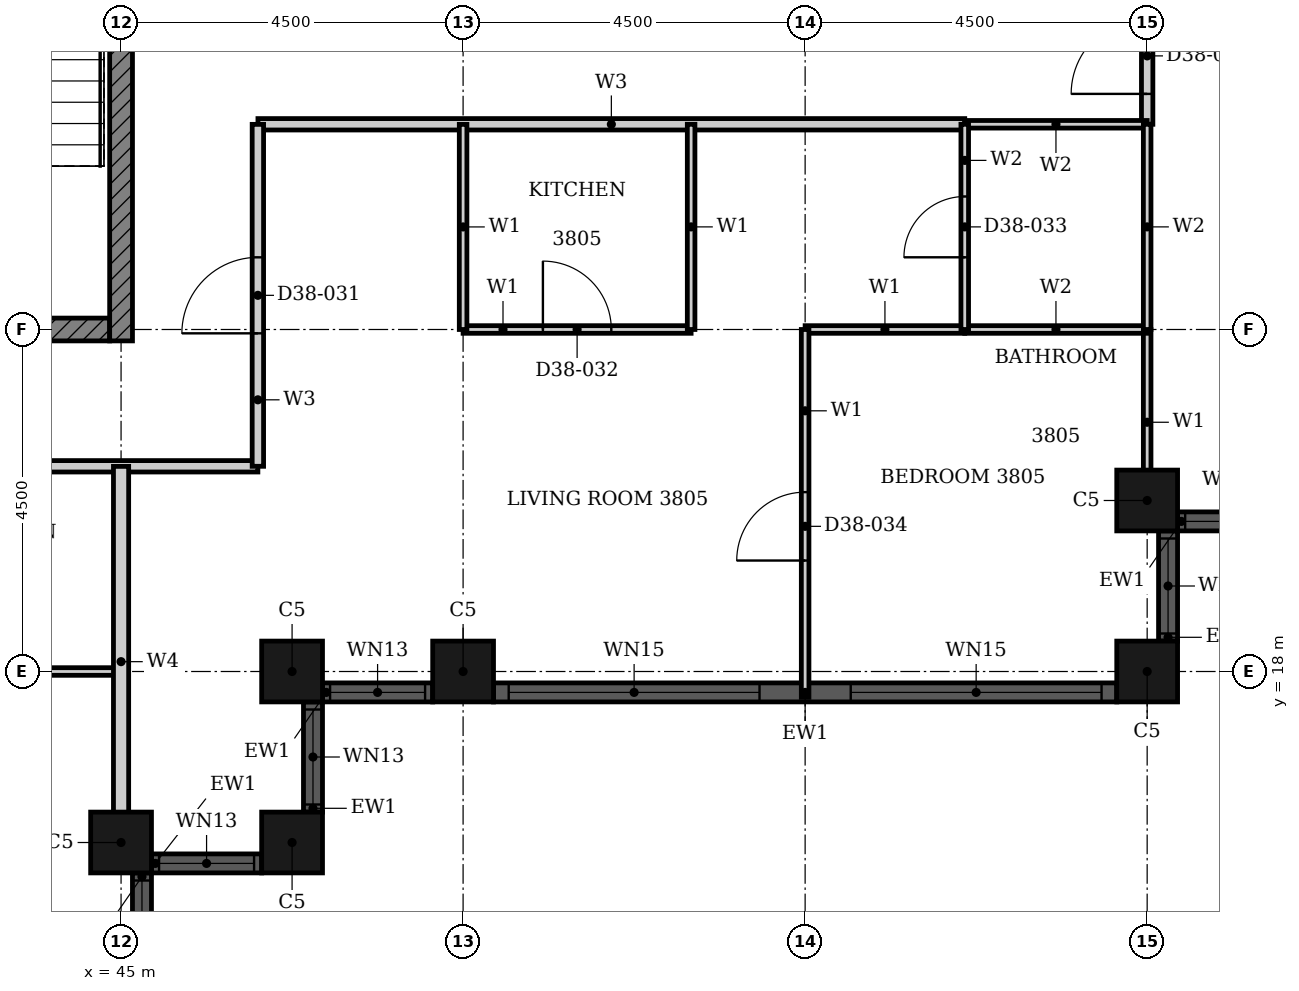
"""IFC4 building model, lengths in metres.
Left out: names, types, materials, properties, quantities, classifications, styles, units other than length and angle.
Written with IfcOpenShell. Run it as: python <this file> out.ifc"""

import sys

from ifc_helpers import new_model, si_unit, direction, frame, frame_2d, origin, origin_2d, place, context, subcontext, project, spatial, rectangle, hollow_rectangle, extrude, element, fill, save


model = new_model("IFC4")
c1 = context("Model", 3, precision=1e-05, world=origin(), true_north=direction((0.0, 1.0)))
c2 = subcontext(c1, "Body", "Model", "MODEL_VIEW")
j1 = project(units=[si_unit("LENGTHUNIT", "METRE"), si_unit("PLANEANGLEUNIT", "RADIAN")], contexts=[c1])
p1 = place(None, origin())
s1 = spatial("IfcSite", under=j1, at=p1, CompositionType="ELEMENT")
p2 = place(p1, origin())
s2 = spatial("IfcBuilding", under=s1, at=p2, CompositionType="ELEMENT")
p3 = place(p2, frame((0.0, 0.0, 154.3)))
s3 = spatial("IfcBuildingStorey", under=s2, at=p3, CompositionType="ELEMENT", Elevation=154.3)
for number, where, z_axis, x_axis in (
    (1, (45.0, 15.75, 0.0), (0.0, 0.0, 1.0), (1.0, 0.0, 0.0)),
    (2, (47.25, 15.75, 0.0), (0.0, 0.0, 1.0), (1.0, 0.0, 0.0)),
    (3, (47.25, 18.0, 0.0), (0.0, 0.0, 1.0), (1.0, 0.0, 0.0)),
    (4, (49.5, 18.0, 0.0), (0.0, 0.0, 1.0), (1.0, 0.0, 0.0)),
    (5, (58.5, 18.0, 0.0), (0.0, 0.0, 1.0), (1.0, 0.0, 0.0)),
    (6, (58.5, 20.25, 0.0), (0.0, 0.0, 1.0), (1.0, 0.0, 0.0)),
):
    element("IfcColumn", number, at=place(p3, frame(where, z_axis=z_axis, x_axis=x_axis)), inside=s3, PredefinedType="COLUMN", context=c2, shape_type="SweptSolid", body=[
        extrude(hollow_rectangle(XDim=0.8, YDim=0.8, WallThickness=0.025, at=origin_2d()), origin(), (0.0, 0.0, 1.0), 3.7),
    ])
p4 = place(p3, frame((45.275, 13.9, 0.0), z_axis=(0.0, 0.0, 1.0), x_axis=(0.0, 1.0, 0.0)))
e7 = element("IfcWall", 7, at=p4, inside=s3, PredefinedType="SOLIDWALL", context=c2, shape_type="SweptSolid", body=[
    extrude(rectangle(XDim=1.45, YDim=0.25, at=frame_2d((0.725, 0.0))), origin(), (0.0, 0.0, 1.0), 3.7),
])
p5 = place(p4, frame((0.1, 0.0, 0.9)))
e8 = element("IfcOpeningElement", 8, at=p5, cuts=e7, PredefinedType="OPENING", context=c2, shape_type="SweptSolid", body=[
    extrude(rectangle(XDim=1.25, YDim=1.85, at=frame_2d((0.625, 0.925))), frame((0.0, 0.135, 0.0), z_axis=(0.0, -1.0, 0.0), x_axis=(1.0, 0.0, 0.0)), (0.0, 0.0, 1.0), 0.27),
])
p6 = place(p3, frame((45.4, 15.475, 0.0), z_axis=(0.0, 0.0, 1.0), x_axis=(1.0, 0.0, 0.0)))
e9 = element("IfcWall", 9, at=p6, inside=s3, PredefinedType="SOLIDWALL", context=c2, shape_type="SweptSolid", body=[
    extrude(rectangle(XDim=1.45, YDim=0.25, at=frame_2d((0.725, 0.0))), origin(), (0.0, 0.0, 1.0), 3.7),
])
p7 = place(p6, frame((0.1, 0.0, 0.9)))
e10 = element("IfcOpeningElement", 10, at=p7, cuts=e9, PredefinedType="OPENING", context=c2, shape_type="SweptSolid", body=[
    extrude(rectangle(XDim=1.25, YDim=1.85, at=frame_2d((0.625, 0.925))), frame((0.0, 0.135, 0.0), z_axis=(0.0, -1.0, 0.0), x_axis=(1.0, 0.0, 0.0)), (0.0, 0.0, 1.0), 0.27),
])
p8 = place(p3, frame((47.525, 16.15, 0.0), z_axis=(0.0, 0.0, 1.0), x_axis=(0.0, 1.0, 0.0)))
e11 = element("IfcWall", 11, at=p8, inside=s3, PredefinedType="SOLIDWALL", context=c2, shape_type="SweptSolid", body=[
    extrude(rectangle(XDim=1.45, YDim=0.25, at=frame_2d((0.725, 0.0))), origin(), (0.0, 0.0, 1.0), 3.7),
])
p9 = place(p8, frame((0.1, 0.0, 0.9)))
e12 = element("IfcOpeningElement", 12, at=p9, cuts=e11, PredefinedType="OPENING", context=c2, shape_type="SweptSolid", body=[
    extrude(rectangle(XDim=1.25, YDim=1.85, at=frame_2d((0.625, 0.925))), frame((0.0, 0.135, 0.0), z_axis=(0.0, -1.0, 0.0), x_axis=(1.0, 0.0, 0.0)), (0.0, 0.0, 1.0), 0.27),
])
p10 = place(p3, frame((47.65, 17.725, 0.0), z_axis=(0.0, 0.0, 1.0), x_axis=(1.0, 0.0, 0.0)))
e13 = element("IfcWall", 13, at=p10, inside=s3, PredefinedType="SOLIDWALL", context=c2, shape_type="SweptSolid", body=[
    extrude(rectangle(XDim=1.45, YDim=0.25, at=frame_2d((0.725, 0.0))), origin(), (0.0, 0.0, 1.0), 3.7),
])
p11 = place(p10, frame((0.1, 0.0, 0.9)))
e14 = element("IfcOpeningElement", 14, at=p11, cuts=e13, PredefinedType="OPENING", context=c2, shape_type="SweptSolid", body=[
    extrude(rectangle(XDim=1.25, YDim=1.85, at=frame_2d((0.625, 0.925))), frame((0.0, 0.135, 0.0), z_axis=(0.0, -1.0, 0.0), x_axis=(1.0, 0.0, 0.0)), (0.0, 0.0, 1.0), 0.27),
])
p12 = place(p3, frame((49.9, 17.725, 0.0), z_axis=(0.0, 0.0, 1.0), x_axis=(1.0, 0.0, 0.0)))
e15 = element("IfcWall", 15, at=p12, inside=s3, PredefinedType="SOLIDWALL", context=c2, shape_type="SweptSolid", body=[
    extrude(rectangle(XDim=8.2, YDim=0.25, at=frame_2d((4.1, 0.0))), origin(), (0.0, 0.0, 1.0), 3.7),
])
p13 = place(p12, frame((0.2, 0.0, 0.45)))
e16 = element("IfcOpeningElement", 16, at=p13, cuts=e15, PredefinedType="OPENING", context=c2, shape_type="SweptSolid", body=[
    extrude(rectangle(XDim=3.3, YDim=2.3, at=frame_2d((1.65, 1.15))), frame((0.0, 0.135, 0.0), z_axis=(0.0, -1.0, 0.0), x_axis=(1.0, 0.0, 0.0)), (0.0, 0.0, 1.0), 0.27),
])
p14 = place(p12, frame((4.7, 0.0, 0.45)))
e17 = element("IfcOpeningElement", 17, at=p14, cuts=e15, PredefinedType="OPENING", context=c2, shape_type="SweptSolid", body=[
    extrude(rectangle(XDim=3.3, YDim=2.3, at=frame_2d((1.65, 1.15))), frame((0.0, 0.135, 0.0), z_axis=(0.0, -1.0, 0.0), x_axis=(1.0, 0.0, 0.0)), (0.0, 0.0, 1.0), 0.27),
])
p15 = place(p3, frame((58.775, 18.4, 0.0), z_axis=(0.0, 0.0, 1.0), x_axis=(0.0, 1.0, 0.0)))
e18 = element("IfcWall", 18, at=p15, inside=s3, PredefinedType="SOLIDWALL", context=c2, shape_type="SweptSolid", body=[
    extrude(rectangle(XDim=1.45, YDim=0.25, at=frame_2d((0.725, 0.0))), origin(), (0.0, 0.0, 1.0), 3.7),
])
p16 = place(p15, frame((0.1, 0.0, 0.9)))
e19 = element("IfcOpeningElement", 19, at=p16, cuts=e18, PredefinedType="OPENING", context=c2, shape_type="SweptSolid", body=[
    extrude(rectangle(XDim=1.25, YDim=1.85, at=frame_2d((0.625, 0.925))), frame((0.0, 0.135, 0.0), z_axis=(0.0, -1.0, 0.0), x_axis=(1.0, 0.0, 0.0)), (0.0, 0.0, 1.0), 0.27),
])
p17 = place(p3, frame((58.9, 19.975, 0.0), z_axis=(0.0, 0.0, 1.0), x_axis=(1.0, 0.0, 0.0)))
e20 = element("IfcWall", 20, at=p17, inside=s3, PredefinedType="SOLIDWALL", context=c2, shape_type="SweptSolid", body=[
    extrude(rectangle(XDim=1.45, YDim=0.25, at=frame_2d((0.725, 0.0))), origin(), (0.0, 0.0, 1.0), 3.7),
])
p18 = place(p17, frame((0.1, 0.0, 0.9)))
e21 = element("IfcOpeningElement", 21, at=p18, cuts=e20, PredefinedType="OPENING", context=c2, shape_type="SweptSolid", body=[
    extrude(rectangle(XDim=1.25, YDim=1.85, at=frame_2d((0.625, 0.925))), frame((0.0, 0.135, 0.0), z_axis=(0.0, -1.0, 0.0), x_axis=(1.0, 0.0, 0.0)), (0.0, 0.0, 1.0), 0.27),
])
p19 = place(p3, frame((32.911, 22.5, 0.0), z_axis=(0.0, 0.0, 1.0), x_axis=(1.0, 0.0, 0.0)))
e22 = element("IfcWall", 22, at=p19, inside=s3, PredefinedType="SHEAR", context=c2, shape_type="SweptSolid", body=[
    extrude(rectangle(XDim=11.939, YDim=0.3, at=frame_2d((5.97, 0.0))), origin(), (0.0, 0.0, 1.0), 3.4),
])
p20 = place(p19, frame((5.404, 0.0, 0.0)))
e23 = element("IfcOpeningElement", 23, at=p20, cuts=e22, PredefinedType="OPENING", context=c2, shape_type="SweptSolid", body=[
    extrude(rectangle(XDim=1.8, YDim=2.1, at=frame_2d((0.9, 1.05))), frame((0.0, 0.16, 0.0), z_axis=(0.0, -1.0, 0.0), x_axis=(1.0, 0.0, 0.0)), (0.0, 0.0, 1.0), 0.32),
])
p21 = place(p3, frame((45.0, 22.35, 0.0), z_axis=(0.0, 0.0, 1.0), x_axis=(0.0, 1.0, 0.0)))
e24 = element("IfcWall", 24, at=p21, inside=s3, PredefinedType="SHEAR", context=c2, shape_type="SweptSolid", body=[
    extrude(rectangle(XDim=9.3, YDim=0.3, at=frame_2d((4.65, 0.0))), origin(), (0.0, 0.0, 1.0), 3.4),
])
p22 = place(p3, frame((38.4, 20.7, 0.0), z_axis=(0.0, 0.0, 1.0), x_axis=(1.0, 0.0, 0.0)))
e25 = element("IfcWall", 25, at=p22, inside=s3, PredefinedType="PARTITIONING", context=c2, shape_type="SweptSolid", body=[
    extrude(rectangle(XDim=8.4, YDim=0.15, at=frame_2d((4.2, 0.0))), origin(), (0.0, 0.0, 1.0), 3.4),
])
p23 = place(p3, frame((46.801, 25.2, 0.0), z_axis=(0.0, 0.0, 1.0), x_axis=(1.0, 0.0, 0.0)))
e26 = element("IfcWall", 26, at=p23, inside=s3, PredefinedType="PARTITIONING", context=c2, shape_type="SweptSolid", body=[
    extrude(rectangle(XDim=9.299, YDim=0.15, at=frame_2d((4.649, 0.0))), origin(), (0.0, 0.0, 1.0), 3.4),
])
p24 = place(p3, frame((46.8, 20.7, 0.0), z_axis=(0.0, 0.0, 1.0), x_axis=(0.0, 1.0, 0.0)))
e27 = element("IfcWall", 27, at=p24, inside=s3, PredefinedType="PARTITIONING", context=c2, shape_type="SweptSolid", body=[
    extrude(rectangle(XDim=4.499, YDim=0.15, at=frame_2d((2.25, 0.0))), origin(), (0.0, 0.0, 1.0), 3.4),
])
p25 = place(p24, frame((1.75, 0.0, 0.0)))
e28 = element("IfcOpeningElement", 28, at=p25, cuts=e27, PredefinedType="OPENING", context=c2, shape_type="SweptSolid", body=[
    extrude(rectangle(XDim=1.0, YDim=2.2, at=frame_2d((0.5, 1.1))), frame((0.0, 0.085, 0.0), z_axis=(0.0, -1.0, 0.0), x_axis=(1.0, 0.0, 0.0)), (0.0, 0.0, 1.0), 0.17),
])
p26 = place(p3, frame((58.5, 25.2, 0.0), z_axis=(0.0, 0.0, 1.0), x_axis=(0.0, 1.0, 0.0)))
e29 = element("IfcWall", 29, at=p26, inside=s3, PredefinedType="PARTITIONING", context=c2, shape_type="SweptSolid", body=[
    extrude(rectangle(XDim=1.8, YDim=0.15, at=frame_2d((0.9, 0.0))), origin(), (0.0, 0.0, 1.0), 3.4),
])
p27 = place(p26, frame((0.4, 0.0, 0.0)))
e30 = element("IfcOpeningElement", 30, at=p27, cuts=e29, PredefinedType="OPENING", context=c2, shape_type="SweptSolid", body=[
    extrude(rectangle(XDim=1.0, YDim=2.1, at=frame_2d((0.5, 1.05))), frame((0.0, 0.085, 0.0), z_axis=(0.0, -1.0, 0.0), x_axis=(1.0, 0.0, 0.0)), (0.0, 0.0, 1.0), 0.17),
])
p28 = place(p3, frame((42.0, 18.0, 0.0), z_axis=(0.0, 0.0, 1.0), x_axis=(1.0, 0.0, 0.0)))
e31 = element("IfcWall", 31, at=p28, inside=s3, PredefinedType="PARTITIONING", context=c2, shape_type="SweptSolid", body=[
    extrude(rectangle(XDim=3.0, YDim=0.1, at=frame_2d((1.5, 0.0))), origin(), (0.0, 0.0, 1.0), 3.4),
])
p29 = place(p28, frame((1.05, 0.0, 0.0)))
e32 = element("IfcOpeningElement", 32, at=p29, cuts=e31, PredefinedType="OPENING", context=c2, shape_type="SweptSolid", body=[
    extrude(rectangle(XDim=0.9, YDim=2.1, at=frame_2d((0.45, 1.05))), frame((0.0, 0.06, 0.0), z_axis=(0.0, -1.0, 0.0), x_axis=(1.0, 0.0, 0.0)), (0.0, 0.0, 1.0), 0.12),
])
p30 = place(p3, frame((54.0, 22.5, 0.0), z_axis=(0.0, 0.0, 1.0), x_axis=(1.0, 0.0, 0.0)))
e33 = element("IfcWall", 33, at=p30, inside=s3, PredefinedType="PARTITIONING", context=c2, shape_type="SweptSolid", body=[
    extrude(rectangle(XDim=2.1, YDim=0.1, at=frame_2d((1.05, 0.0))), origin(), (0.0, 0.0, 1.0), 2.68),
])
p31 = place(p3, frame((49.5, 22.5, 0.0), z_axis=(0.0, 0.0, 1.0), x_axis=(1.0, 0.0, 0.0)))
e34 = element("IfcWall", 34, at=p31, inside=s3, PredefinedType="PARTITIONING", context=c2, shape_type="SweptSolid", body=[
    extrude(rectangle(XDim=3.0, YDim=0.1, at=frame_2d((1.5, 0.0))), origin(), (0.0, 0.0, 1.0), 2.68),
])
p32 = place(p31, frame((1.05, 0.0, 0.0)))
e35 = element("IfcOpeningElement", 35, at=p32, cuts=e34, PredefinedType="OPENING", context=c2, shape_type="SweptSolid", body=[
    extrude(rectangle(XDim=0.9, YDim=2.1, at=frame_2d((0.45, 1.05))), frame((0.0, 0.06, 0.0), z_axis=(0.0, -1.0, 0.0), x_axis=(1.0, 0.0, 0.0)), (0.0, 0.0, 1.0), 0.12),
])
p33 = place(p3, frame((49.5, 22.5, 0.0), z_axis=(0.0, 0.0, 1.0), x_axis=(0.0, 1.0, 0.0)))
e36 = element("IfcWall", 36, at=p33, inside=s3, PredefinedType="PARTITIONING", context=c2, shape_type="SweptSolid", body=[
    extrude(rectangle(XDim=2.699, YDim=0.1, at=frame_2d((1.35, 0.0))), origin(), (0.0, 0.0, 1.0), 2.48),
])
p34 = place(p3, frame((52.5, 22.5, 0.0), z_axis=(0.0, 0.0, 1.0), x_axis=(0.0, 1.0, 0.0)))
e37 = element("IfcWall", 37, at=p34, inside=s3, PredefinedType="PARTITIONING", context=c2, shape_type="SweptSolid", body=[
    extrude(rectangle(XDim=2.7, YDim=0.1, at=frame_2d((1.35, 0.0))), origin(), (0.0, 0.0, 1.0), 3.4),
])
p35 = place(p3, frame((54.0, 17.66, 0.0), z_axis=(0.0, 0.0, 1.0), x_axis=(0.0, 1.0, 0.0)))
e38 = element("IfcWall", 38, at=p35, inside=s3, PredefinedType="PARTITIONING", context=c2, shape_type="SweptSolid", body=[
    extrude(rectangle(XDim=4.84, YDim=0.1, at=frame_2d((2.42, 0.0))), origin(), (0.0, 0.0, 1.0), 3.4),
])
p36 = place(p35, frame((1.8, 0.0, 0.0)))
e39 = element("IfcOpeningElement", 39, at=p36, cuts=e38, PredefinedType="OPENING", context=c2, shape_type="SweptSolid", body=[
    extrude(rectangle(XDim=0.9, YDim=2.1, at=frame_2d((0.45, 1.05))), frame((0.0, 0.06, 0.0), z_axis=(0.0, -1.0, 0.0), x_axis=(1.0, 0.0, 0.0)), (0.0, 0.0, 1.0), 0.12),
])
p37 = place(p3, frame((58.5, 20.06, 0.0), z_axis=(0.0, 0.0, 1.0), x_axis=(0.0, 1.0, 0.0)))
e40 = element("IfcWall", 40, at=p37, inside=s3, PredefinedType="PARTITIONING", context=c2, shape_type="SweptSolid", body=[
    extrude(rectangle(XDim=2.439, YDim=0.1, at=frame_2d((1.219, 0.0))), origin(), (0.0, 0.0, 1.0), 3.4),
])
p38 = place(p3, frame((45.0, 15.56, 0.0), z_axis=(0.0, 0.0, 1.0), x_axis=(0.0, 1.0, 0.0)))
e41 = element("IfcWall", 41, at=p38, inside=s3, PredefinedType="PARTITIONING", context=c2, shape_type="SweptSolid", body=[
    extrude(rectangle(XDim=5.139, YDim=0.2, at=frame_2d((2.569, 0.0))), origin(), (0.0, 0.0, 1.0), 3.4),
])
p39 = place(p3, frame((56.1, 22.5, 0.0), z_axis=(0.0, 0.0, 1.0), x_axis=(1.0, 0.0, 0.0)))
e42 = element("IfcWall", 42, at=p39, inside=s3, PredefinedType="PARTITIONING", context=c2, shape_type="SweptSolid", body=[
    extrude(rectangle(XDim=2.4, YDim=0.1, at=frame_2d((1.2, 0.0))), origin(), (0.0, 0.0, 1.0), 2.68),
])
p40 = place(p3, frame((56.1, 25.2, 0.0), z_axis=(0.0, 0.0, 1.0), x_axis=(1.0, 0.0, 0.0)))
e43 = element("IfcWall", 43, at=p40, inside=s3, PredefinedType="PARTITIONING", context=c2, shape_type="SweptSolid", body=[
    extrude(rectangle(XDim=2.4, YDim=0.1, at=frame_2d((1.2, 0.0))), origin(), (0.0, 0.0, 1.0), 3.4),
])
p41 = place(p3, frame((56.1, 22.5, 0.0), z_axis=(0.0, 0.0, 1.0), x_axis=(0.0, 1.0, 0.0)))
e44 = element("IfcWall", 44, at=p41, inside=s3, PredefinedType="PARTITIONING", context=c2, shape_type="SweptSolid", body=[
    extrude(rectangle(XDim=2.7, YDim=0.1, at=frame_2d((1.35, 0.0))), origin(), (0.0, 0.0, 1.0), 3.4),
])
p42 = place(p41, frame((0.95, 0.0, 0.0)))
e45 = element("IfcOpeningElement", 45, at=p42, cuts=e44, PredefinedType="OPENING", context=c2, shape_type="SweptSolid", body=[
    extrude(rectangle(XDim=0.8, YDim=2.1, at=frame_2d((0.4, 1.05))), frame((0.0, 0.06, 0.0), z_axis=(0.0, -1.0, 0.0), x_axis=(1.0, 0.0, 0.0)), (0.0, 0.0, 1.0), 0.12),
])
p43 = place(p3, frame((58.5, 22.5, 0.0), z_axis=(0.0, 0.0, 1.0), x_axis=(0.0, 1.0, 0.0)))
e46 = element("IfcWall", 46, at=p43, inside=s3, PredefinedType="PARTITIONING", context=c2, shape_type="SweptSolid", body=[
    extrude(rectangle(XDim=2.7, YDim=0.1, at=frame_2d((1.35, 0.0))), origin(), (0.0, 0.0, 1.0), 3.4),
])
p44 = place(p5, origin())
e47 = element("IfcWindow", 47, at=p44, inside=s3, PartitioningType="SINGLE_PANEL", PredefinedType="WINDOW", context=c2, shape_type="SweptSolid", body=[
    extrude(rectangle(XDim=1.25, YDim=1.85, at=frame_2d((0.625, 0.925))), frame((0.0, 0.03, 0.0), z_axis=(0.0, -1.0, 0.0), x_axis=(1.0, 0.0, 0.0)), (0.0, 0.0, 1.0), 0.06),
])
fill(e8, e47)
p45 = place(p7, origin())
e48 = element("IfcWindow", 48, at=p45, inside=s3, PartitioningType="SINGLE_PANEL", PredefinedType="WINDOW", context=c2, shape_type="SweptSolid", body=[
    extrude(rectangle(XDim=1.25, YDim=1.85, at=frame_2d((0.625, 0.925))), frame((0.0, 0.03, 0.0), z_axis=(0.0, -1.0, 0.0), x_axis=(1.0, 0.0, 0.0)), (0.0, 0.0, 1.0), 0.06),
])
fill(e10, e48)
p46 = place(p9, origin())
e49 = element("IfcWindow", 49, at=p46, inside=s3, PartitioningType="SINGLE_PANEL", PredefinedType="WINDOW", context=c2, shape_type="SweptSolid", body=[
    extrude(rectangle(XDim=1.25, YDim=1.85, at=frame_2d((0.625, 0.925))), frame((0.0, 0.03, 0.0), z_axis=(0.0, -1.0, 0.0), x_axis=(1.0, 0.0, 0.0)), (0.0, 0.0, 1.0), 0.06),
])
fill(e12, e49)
p47 = place(p11, origin())
e50 = element("IfcWindow", 50, at=p47, inside=s3, PartitioningType="SINGLE_PANEL", PredefinedType="WINDOW", context=c2, shape_type="SweptSolid", body=[
    extrude(rectangle(XDim=1.25, YDim=1.85, at=frame_2d((0.625, 0.925))), frame((0.0, 0.03, 0.0), z_axis=(0.0, -1.0, 0.0), x_axis=(1.0, 0.0, 0.0)), (0.0, 0.0, 1.0), 0.06),
])
fill(e14, e50)
p48 = place(p13, origin())
e51 = element("IfcWindow", 51, at=p48, inside=s3, PartitioningType="SINGLE_PANEL", PredefinedType="WINDOW", context=c2, shape_type="SweptSolid", body=[
    extrude(rectangle(XDim=3.3, YDim=2.3, at=frame_2d((1.65, 1.15))), frame((0.0, 0.03, 0.0), z_axis=(0.0, -1.0, 0.0), x_axis=(1.0, 0.0, 0.0)), (0.0, 0.0, 1.0), 0.06),
])
fill(e16, e51)
p49 = place(p14, origin())
e52 = element("IfcWindow", 52, at=p49, inside=s3, PartitioningType="SINGLE_PANEL", PredefinedType="WINDOW", context=c2, shape_type="SweptSolid", body=[
    extrude(rectangle(XDim=3.3, YDim=2.3, at=frame_2d((1.65, 1.15))), frame((0.0, 0.03, 0.0), z_axis=(0.0, -1.0, 0.0), x_axis=(1.0, 0.0, 0.0)), (0.0, 0.0, 1.0), 0.06),
])
fill(e17, e52)
p50 = place(p16, origin())
e53 = element("IfcWindow", 53, at=p50, inside=s3, PartitioningType="SINGLE_PANEL", PredefinedType="WINDOW", context=c2, shape_type="SweptSolid", body=[
    extrude(rectangle(XDim=1.25, YDim=1.85, at=frame_2d((0.625, 0.925))), frame((0.0, 0.03, 0.0), z_axis=(0.0, -1.0, 0.0), x_axis=(1.0, 0.0, 0.0)), (0.0, 0.0, 1.0), 0.06),
])
fill(e19, e53)
p51 = place(p18, origin())
e54 = element("IfcWindow", 54, at=p51, inside=s3, PartitioningType="SINGLE_PANEL", PredefinedType="WINDOW", context=c2, shape_type="SweptSolid", body=[
    extrude(rectangle(XDim=1.25, YDim=1.85, at=frame_2d((0.625, 0.925))), frame((0.0, 0.03, 0.0), z_axis=(0.0, -1.0, 0.0), x_axis=(1.0, 0.0, 0.0)), (0.0, 0.0, 1.0), 0.06),
])
fill(e21, e54)
p52 = place(p25, origin())
e55 = element("IfcDoor", 55, at=p52, inside=s3, OperationType="SINGLE_SWING_RIGHT", PredefinedType="DOOR", context=c2, shape_type="SweptSolid", body=[
    extrude(rectangle(XDim=1.0, YDim=2.2, at=frame_2d((0.5, 1.1))), frame((0.0, 0.025, 0.0), z_axis=(0.0, -1.0, 0.0), x_axis=(1.0, 0.0, 0.0)), (0.0, 0.0, 1.0), 0.05),
])
fill(e28, e55)
p53 = place(p32, origin())
e56 = element("IfcDoor", 56, at=p53, inside=s3, OperationType="SINGLE_SWING_LEFT", PredefinedType="DOOR", context=c2, shape_type="SweptSolid", body=[
    extrude(rectangle(XDim=0.9, YDim=2.1, at=frame_2d((0.45, 1.05))), frame((0.0, 0.025, 0.0), z_axis=(0.0, -1.0, 0.0), x_axis=(1.0, 0.0, 0.0)), (0.0, 0.0, 1.0), 0.05),
])
fill(e35, e56)
p54 = place(p42, origin())
e57 = element("IfcDoor", 57, at=p54, inside=s3, OperationType="SINGLE_SWING_RIGHT", PredefinedType="DOOR", context=c2, shape_type="SweptSolid", body=[
    extrude(rectangle(XDim=0.8, YDim=2.1, at=frame_2d((0.4, 1.05))), frame((0.0, 0.025, 0.0), z_axis=(0.0, -1.0, 0.0), x_axis=(1.0, 0.0, 0.0)), (0.0, 0.0, 1.0), 0.05),
])
fill(e45, e57)
p55 = place(p36, origin())
e58 = element("IfcDoor", 58, at=p55, inside=s3, OperationType="SINGLE_SWING_LEFT", PredefinedType="DOOR", context=c2, shape_type="SweptSolid", body=[
    extrude(rectangle(XDim=0.9, YDim=2.1, at=frame_2d((0.45, 1.05))), frame((0.0, 0.025, 0.0), z_axis=(0.0, -1.0, 0.0), x_axis=(1.0, 0.0, 0.0)), (0.0, 0.0, 1.0), 0.05),
])
fill(e39, e58)
p56 = place(p27, origin())
e59 = element("IfcDoor", 59, at=p56, inside=s3, OperationType="SINGLE_SWING_RIGHT", PredefinedType="DOOR", context=c2, shape_type="SweptSolid", body=[
    extrude(rectangle(XDim=1.0, YDim=2.1, at=frame_2d((0.5, 1.05))), frame((0.0, 0.025, 0.0), z_axis=(0.0, -1.0, 0.0), x_axis=(1.0, 0.0, 0.0)), (0.0, 0.0, 1.0), 0.05),
])
fill(e30, e59)
save(model, sys.argv[1])
